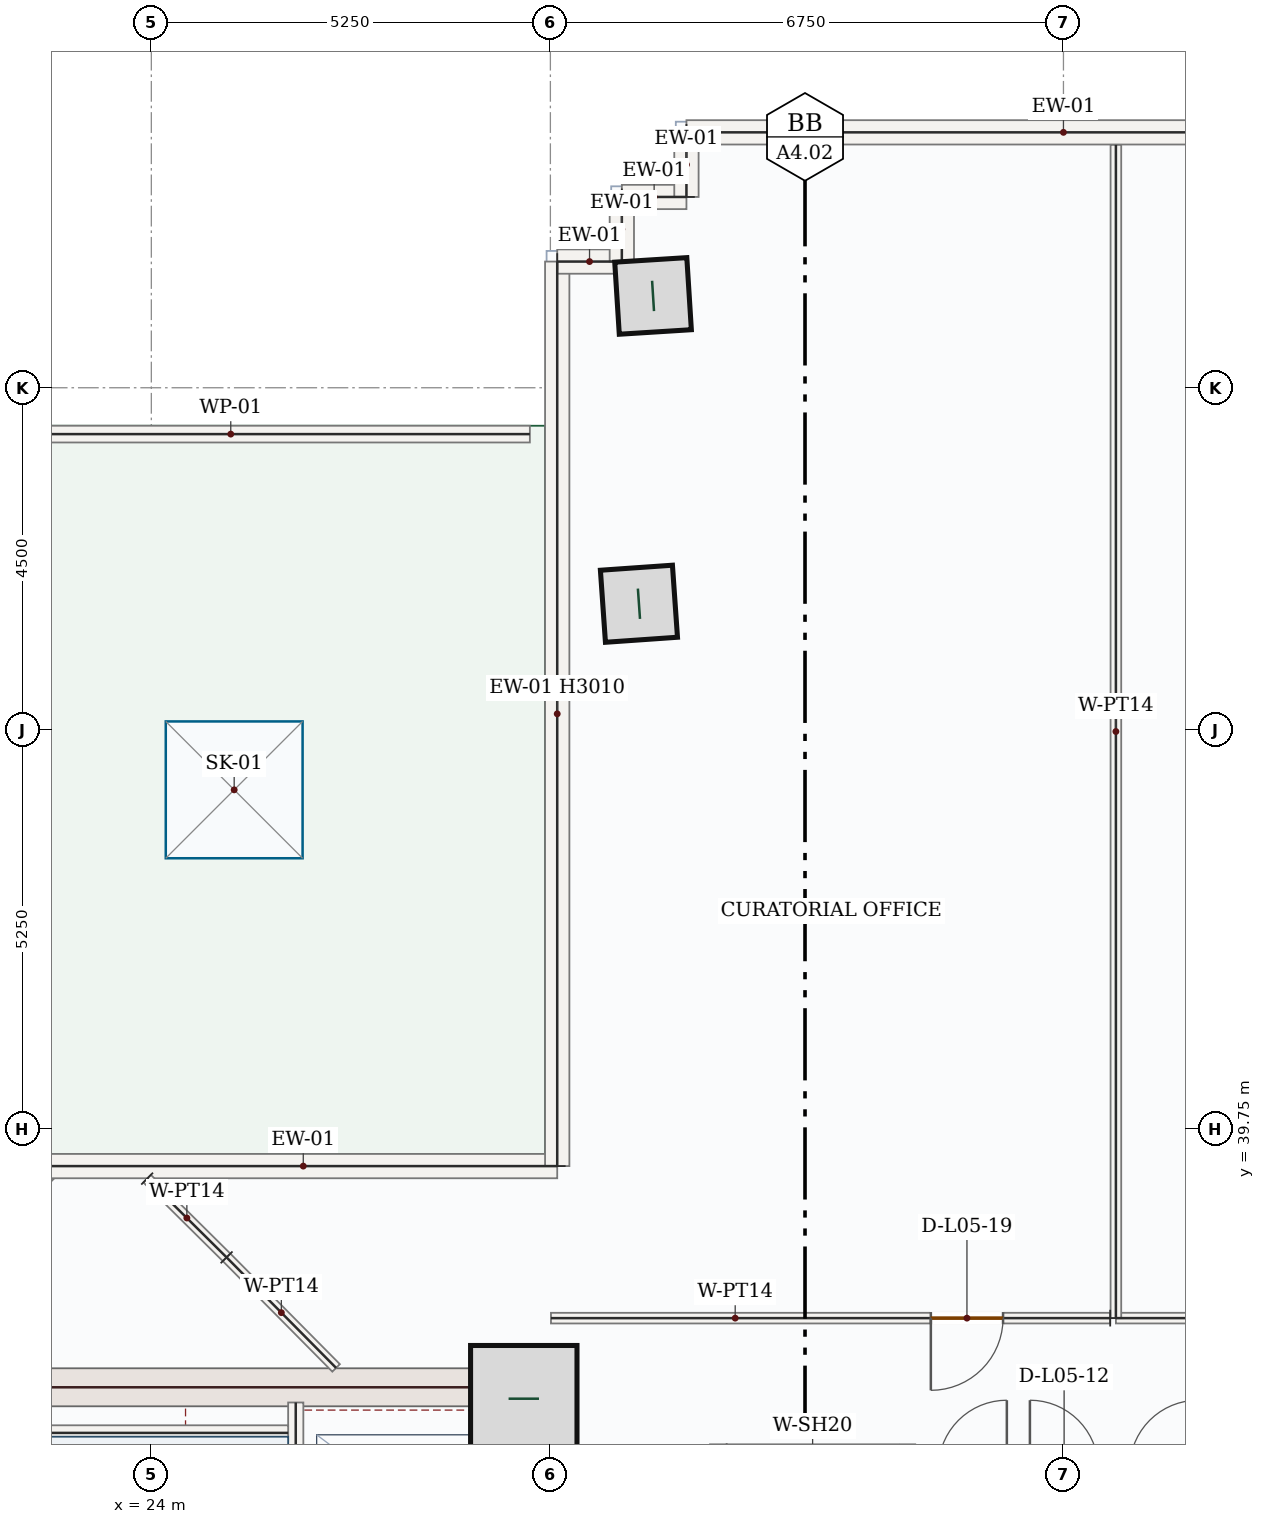
"""IFC4 building model, lengths in metres.
Left out: names, types, materials, properties, quantities, classifications, styles, units other than length and angle.
Written with IfcOpenShell. Run it as: python <this file> out.ifc"""

import sys

from ifc_helpers import new_model, si_unit, direction, frame, frame_2d, origin, origin_2d, place, context, subcontext, project, spatial, rectangle, hollow_rectangle, extrude, source, transform, mapped, element, fill, save


model = new_model("IFC4")
c1 = context("Model", 3, precision=1e-05, world=origin(), true_north=direction((0.0, 1.0)))
c2 = subcontext(c1, "Body", "Model", "MODEL_VIEW")
j1 = project(units=[si_unit("LENGTHUNIT", "METRE"), si_unit("PLANEANGLEUNIT", "RADIAN")], contexts=[c1])
p1 = place(None, origin())
s1 = spatial("IfcSite", under=j1, at=p1, CompositionType="ELEMENT")
p2 = place(p1, origin())
s2 = spatial("IfcBuilding", under=s1, at=p2, CompositionType="ELEMENT")
p3 = place(p2, frame((0.0, 0.0, 29.1)))
s3 = spatial("IfcBuildingStorey", under=s2, at=p3, CompositionType="ELEMENT", Elevation=29.1)
p4 = place(p3, frame((29.0, 28.05, 0.0), z_axis=(0.0, 0.0, 1.0), x_axis=(0.0, 1.0, 0.0)))
e1 = element("IfcWall", 1, at=p4, inside=s3, PredefinedType="SHEAR", context=c2, shape_type="SweptSolid", body=[
    extrude(rectangle(XDim=8.55, YDim=0.5, at=frame_2d((4.275, 0.0))), origin(), (0.0, 0.0, 1.0), 3.95),
])
p5 = place(p4, frame((1.5, 0.0, 0.0)))
e2 = element("IfcOpeningElement", 2, at=p5, cuts=e1, PredefinedType="OPENING", context=c2, shape_type="SweptSolid", body=[
    extrude(rectangle(XDim=1.1, YDim=2.2, at=frame_2d((0.55, 1.1))), frame((0.0, 0.26, 0.0), z_axis=(0.0, -1.0, 0.0), x_axis=(1.0, 0.0, 0.0)), (0.0, 0.0, 1.0), 0.52),
])
m1 = source(origin(), c2, "Body", "SweptSolid", [
    extrude(rectangle(XDim=7.0, YDim=0.5, at=frame_2d((3.5, 0.0))), origin(), (0.0, 0.0, 1.0), 3.95),
])
p6 = place(p3, frame((21.75, 36.35, 0.0), z_axis=(0.0, 0.0, 1.0), x_axis=(1.0, 0.0, 0.0)))
e3 = element("IfcWall", 3, at=p6, inside=s3, PredefinedType="SHEAR", context=c2, shape_type="MappedRepresentation", body=[
    mapped(m1, transform((0.0, 0.0, 0.0), x_axis=(1.0, 0.0, 0.0), y_axis=(0.0, 1.0, 0.0), z_axis=(0.0, 0.0, 1.0), scale=1.0)),
])
m2 = source(origin(), c2, "Body", "SweptSolid", [
    extrude(rectangle(XDim=1.4, YDim=1.4, at=origin_2d()), origin(), (0.0, 0.0, 1.0), 4.2),
])
p7 = place(p3, frame((28.9, 36.2, 0.0), z_axis=(0.0, 0.0, 1.0), x_axis=(1.0, 0.0, 0.0)))
e4 = element("IfcColumn", 4, at=p7, inside=s3, PredefinedType="COLUMN", context=c2, shape_type="MappedRepresentation", body=[
    mapped(m2, transform((0.0, 0.0, 0.0), x_axis=(1.0, 0.0, 0.0), y_axis=(0.0, 1.0, 0.0), z_axis=(0.0, 0.0, 1.0), scale=1.0)),
])
m3 = source(origin(), c2, "Body", "SweptSolid", [
    extrude(hollow_rectangle(XDim=0.95, YDim=0.95, WallThickness=0.05, at=origin_2d()), origin(), (0.0, 0.0, 1.0), 4.2),
])
for number, where, z_axis, x_axis in (
    (5, (30.415, 46.658, 0.0), (0.0, 0.0, 1.0), (-0.07, 0.998, 0.0)),
    (6, (30.601, 50.708, 0.0), (0.0, 0.0, 1.0), (-0.063, 0.998, 0.0)),
):
    element("IfcColumn", number, at=place(p3, frame(where, z_axis=z_axis, x_axis=x_axis)), inside=s3, PredefinedType="COLUMN", context=c2, shape_type="MappedRepresentation", body=[
        mapped(m3, transform((0.0, 0.0, 0.0), x_axis=(1.0, 0.0, 0.0), y_axis=(0.0, 1.0, 0.0), z_axis=(0.0, 0.0, 1.0), scale=1.0)),
    ])
m4 = source(origin(), c2, "Body", "SweptSolid", [
    extrude(rectangle(XDim=7.87, YDim=0.22, at=frame_2d((3.935, 0.0))), origin(), (0.0, 0.0, 1.0), 1.2),
])
p8 = place(p3, frame((21.11, 48.89, 0.0), z_axis=(0.0, 0.0, 1.0), x_axis=(1.0, 0.0, 0.0)))
e7 = element("IfcWall", 7, at=p8, inside=s3, PredefinedType="PARAPET", context=c2, shape_type="MappedRepresentation", body=[
    mapped(m4, transform((0.0, 0.0, 0.0), x_axis=(1.0, 0.0, 0.0), y_axis=(0.0, 1.0, 0.0), z_axis=(0.0, 0.0, 1.0), scale=1.0)),
])
m5 = source(origin(), c2, "Body", "SweptSolid", [
    extrude(rectangle(XDim=5.258, YDim=0.32, at=frame_2d((2.629, 0.0))), origin(), (0.0, 0.0, 1.0), 3.95),
])
p9 = place(p3, frame((18.94, 35.542, 0.0), z_axis=(0.0, 0.0, 1.0), x_axis=(0.707106781187, 0.707106781187, 0.0)))
e8 = element("IfcWall", 8, at=p9, inside=s3, PredefinedType="SOLIDWALL", context=c2, shape_type="MappedRepresentation", body=[
    mapped(m5, transform((0.0, 0.0, 0.0), x_axis=(1.0, 0.0, 0.0), y_axis=(0.0, 1.0, 0.0), z_axis=(0.0, 0.0, 1.0), scale=1.0)),
])
m6 = source(origin(), c2, "Body", "SweptSolid", [
    extrude(rectangle(XDim=6.682, YDim=0.32, at=frame_2d((3.341, 0.0))), origin(), (0.0, 0.0, 1.0), 3.95),
])
p10 = place(p3, frame((22.658, 39.26, 0.0), z_axis=(0.0, 0.0, 1.0), x_axis=(1.0, 0.0, 0.0)))
e9 = element("IfcWall", 9, at=p10, inside=s3, PredefinedType="SOLIDWALL", context=c2, shape_type="MappedRepresentation", body=[
    mapped(m6, transform((0.0, 0.0, 0.0), x_axis=(1.0, 0.0, 0.0), y_axis=(0.0, 1.0, 0.0), z_axis=(0.0, 0.0, 1.0), scale=1.0)),
])
m7 = source(origin(), c2, "Body", "SweptSolid", [
    extrude(rectangle(XDim=11.9, YDim=0.32, at=frame_2d((5.95, 0.0))), origin(), (0.0, 0.0, 1.0), 3.01),
])
p11 = place(p3, frame((29.34, 39.26, 0.0), z_axis=(0.0, 0.0, 1.0), x_axis=(0.0, 1.0, 0.0)))
e10 = element("IfcWall", 10, at=p11, inside=s3, PredefinedType="SOLIDWALL", context=c2, shape_type="MappedRepresentation", body=[
    mapped(m7, transform((0.0, 0.0, 0.0), x_axis=(1.0, 0.0, 0.0), y_axis=(0.0, 1.0, 0.0), z_axis=(0.0, 0.0, 1.0), scale=1.0)),
])
m8 = source(origin(), c2, "Body", "SweptSolid", [
    extrude(rectangle(XDim=0.85, YDim=0.32, at=frame_2d((0.425, 0.0))), origin(), (0.0, 0.0, 1.0), 3.95),
])
p12 = place(p3, frame((29.34, 51.16, 0.0), z_axis=(0.0, 0.0, 1.0), x_axis=(1.0, 0.0, 0.0)))
e11 = element("IfcWall", 11, at=p12, inside=s3, PredefinedType="SOLIDWALL", context=c2, shape_type="MappedRepresentation", body=[
    mapped(m8, transform((0.0, 0.0, 0.0), x_axis=(1.0, 0.0, 0.0), y_axis=(0.0, 1.0, 0.0), z_axis=(0.0, 0.0, 1.0), scale=1.0)),
])
m9 = source(origin(), c2, "Body", "SweptSolid", [
    extrude(rectangle(XDim=0.85, YDim=0.32, at=frame_2d((0.425, 0.0))), origin(), (0.0, 0.0, 1.0), 3.95),
])
for number, where, z_axis, x_axis in (
    (12, (30.19, 51.16, 0.0), (0.0, 0.0, 1.0), (0.0, 1.0, 0.0)),
    (13, (30.19, 52.01, 0.0), (0.0, 0.0, 1.0), (1.0, 0.0, 0.0)),
    (14, (31.04, 52.01, 0.0), (0.0, 0.0, 1.0), (0.0, 1.0, 0.0)),
):
    element("IfcWall", number, at=place(p3, frame(where, z_axis=z_axis, x_axis=x_axis)), inside=s3, PredefinedType="SOLIDWALL", context=c2, shape_type="MappedRepresentation", body=[
        mapped(m9, transform((0.0, 0.0, 0.0), x_axis=(1.0, 0.0, 0.0), y_axis=(0.0, 1.0, 0.0), z_axis=(0.0, 0.0, 1.0), scale=1.0)),
    ])
m10 = source(origin(), c2, "Body", "SweptSolid", [
    extrude(rectangle(XDim=9.92, YDim=0.32, at=frame_2d((4.96, 0.0))), origin(), (0.0, 0.0, 1.0), 3.95),
])
p13 = place(p3, frame((31.04, 52.86, 0.0), z_axis=(0.0, 0.0, 1.0), x_axis=(1.0, 0.0, 0.0)))
e15 = element("IfcWall", 15, at=p13, inside=s3, PredefinedType="SOLIDWALL", context=c2, shape_type="MappedRepresentation", body=[
    mapped(m10, transform((0.0, 0.0, 0.0), x_axis=(1.0, 0.0, 0.0), y_axis=(0.0, 1.0, 0.0), z_axis=(0.0, 0.0, 1.0), scale=1.0)),
])
p14 = place(p3, frame((25.9, 28.15, 0.0), z_axis=(0.0, 0.0, 1.0), x_axis=(0.0, 1.0, 0.0)))
e16 = element("IfcWall", 16, at=p14, inside=s3, PredefinedType="SOLIDWALL", context=c2, shape_type="SweptSolid", body=[
    extrude(rectangle(XDim=8.0, YDim=0.2, at=frame_2d((4.0, 0.0))), origin(), (0.0, 0.0, 1.0), 3.95),
])
p15 = place(p14, frame((0.4, 0.0, 0.0)))
e17 = element("IfcOpeningElement", 17, at=p15, cuts=e16, PredefinedType="OPENING", context=c2, shape_type="SweptSolid", body=[
    extrude(rectangle(XDim=1.05, YDim=2.15, at=frame_2d((0.525, 1.075))), frame((0.0, 0.11, 0.0), z_axis=(0.0, -1.0, 0.0), x_axis=(1.0, 0.0, 0.0)), (0.0, 0.0, 1.0), 0.22),
])
m11 = source(origin(), c2, "Body", "SweptSolid", [
    extrude(rectangle(XDim=3.25, YDim=0.2, at=frame_2d((1.625, 0.0))), origin(), (0.0, 0.0, 1.0), 3.95),
])
p16 = place(p3, frame((22.55, 35.75, 0.0), z_axis=(0.0, 0.0, 1.0), x_axis=(1.0, 0.0, 0.0)))
e18 = element("IfcWall", 18, at=p16, inside=s3, PredefinedType="SOLIDWALL", context=c2, shape_type="MappedRepresentation", body=[
    mapped(m11, transform((0.0, 0.0, 0.0), x_axis=(1.0, 0.0, 0.0), y_axis=(0.0, 1.0, 0.0), z_axis=(0.0, 0.0, 1.0), scale=1.0)),
])
m12 = source(origin(), c2, "Body", "SweptSolid", [
    extrude(rectangle(XDim=2.4, YDim=0.2, at=frame_2d((1.2, 0.0))), origin(), (0.0, 0.0, 1.0), 3.95),
])
for number, where, z_axis, x_axis in (
    (19, (31.45, 33.2, 0.0), (0.0, 0.0, 1.0), (0.0, 1.0, 0.0)),
    (20, (33.95, 33.2, 0.0), (0.0, 0.0, 1.0), (0.0, 1.0, 0.0)),
):
    element("IfcWall", number, at=place(p3, frame(where, z_axis=z_axis, x_axis=x_axis)), inside=s3, PredefinedType="SOLIDWALL", context=c2, shape_type="MappedRepresentation", body=[
        mapped(m12, transform((0.0, 0.0, 0.0), x_axis=(1.0, 0.0, 0.0), y_axis=(0.0, 1.0, 0.0), z_axis=(0.0, 0.0, 1.0), scale=1.0)),
    ])
m13 = source(origin(), c2, "Body", "SweptSolid", [
    extrude(rectangle(XDim=1.471, YDim=0.14, at=frame_2d((0.736, 0.0))), origin(), (0.0, 0.0, 1.0), 3.95),
])
p17 = place(p3, frame((23.945, 39.095, 0.0), z_axis=(0.0, 0.0, 1.0), x_axis=(0.710417151562, -0.703780840011, 0.0)))
e21 = element("IfcWall", 21, at=p17, inside=s3, PredefinedType="PARTITIONING", context=c2, shape_type="MappedRepresentation", body=[
    mapped(m13, transform((0.0, 0.0, 0.0), x_axis=(1.0, 0.0, 0.0), y_axis=(0.0, 1.0, 0.0), z_axis=(0.0, 0.0, 1.0), scale=1.0)),
])
m14 = source(origin(), c2, "Body", "SweptSolid", [
    extrude(rectangle(XDim=2.047, YDim=0.14, at=frame_2d((1.024, 0.0))), origin(), (0.0, 0.0, 1.0), 3.95),
])
p18 = place(p3, frame((24.99, 38.059, 0.0), z_axis=(0.0, 0.0, 1.0), x_axis=(0.703819772346, -0.710378580797, 0.0)))
e22 = element("IfcWall", 22, at=p18, inside=s3, PredefinedType="PARTITIONING", context=c2, shape_type="MappedRepresentation", body=[
    mapped(m14, transform((0.0, 0.0, 0.0), x_axis=(1.0, 0.0, 0.0), y_axis=(0.0, 1.0, 0.0), z_axis=(0.0, 0.0, 1.0), scale=1.0)),
])
p19 = place(p3, frame((42.742, 37.26, 0.0), z_axis=(0.0, 0.0, 1.0), x_axis=(-0.999999999186, 4.0337219e-05, 0.0)))
e23 = element("IfcWall", 23, at=p19, inside=s3, PredefinedType="PARTITIONING", context=c2, shape_type="SweptSolid", body=[
    extrude(rectangle(XDim=6.052, YDim=0.14, at=frame_2d((3.026, 0.0))), origin(), (0.0, 0.0, 1.0), 3.95),
])
p20 = place(p19, frame((3.98, 0.0, 0.0)))
e24 = element("IfcOpeningElement", 24, at=p20, cuts=e23, PredefinedType="OPENING", context=c2, shape_type="SweptSolid", body=[
    extrude(rectangle(XDim=0.95, YDim=2.15, at=frame_2d((0.475, 1.075))), frame((0.0, 0.08, 0.0), z_axis=(0.0, -1.0, 0.0), x_axis=(1.0, 0.0, 0.0)), (0.0, 0.0, 1.0), 0.16),
])
m15 = source(origin(), c2, "Body", "SweptSolid", [
    extrude(rectangle(XDim=15.435, YDim=0.14, at=frame_2d((7.718, 0.0))), origin(), (0.0, 0.0, 1.0), 3.95),
])
p21 = place(p3, frame((36.69, 37.26, 0.0), z_axis=(0.0, 0.0, 1.0), x_axis=(0.0, 1.0, 0.0)))
e25 = element("IfcWall", 25, at=p21, inside=s3, PredefinedType="PARTITIONING", context=c2, shape_type="MappedRepresentation", body=[
    mapped(m15, transform((0.0, 0.0, 0.0), x_axis=(1.0, 0.0, 0.0), y_axis=(0.0, 1.0, 0.0), z_axis=(0.0, 0.0, 1.0), scale=1.0)),
])
p22 = place(p3, frame((36.615, 37.26, 0.0), z_axis=(0.0, 0.0, 1.0), x_axis=(-0.999999999449, -3.3182904e-05, 0.0)))
e26 = element("IfcWall", 26, at=p22, inside=s3, PredefinedType="PARTITIONING", context=c2, shape_type="SweptSolid", body=[
    extrude(rectangle(XDim=7.357, YDim=0.14, at=frame_2d((3.679, 0.0))), origin(), (0.0, 0.0, 1.0), 3.95),
])
p23 = place(p22, frame((1.41, 0.0, 0.0)))
e27 = element("IfcOpeningElement", 27, at=p23, cuts=e26, PredefinedType="OPENING", context=c2, shape_type="SweptSolid", body=[
    extrude(rectangle(XDim=0.95, YDim=2.15, at=frame_2d((0.475, 1.075))), frame((0.0, 0.08, 0.0), z_axis=(0.0, -1.0, 0.0), x_axis=(1.0, 0.0, 0.0)), (0.0, 0.0, 1.0), 0.16),
])
p24 = place(p3, frame((0.0, 0.0, -0.22)))
p25 = place(p24, frame((25.09, 44.21, 0.0)))
p26 = place(p25, frame((0.0, 0.0, 0.22)))
e28 = element("IfcWindow", 28, at=p26, inside=s3, PartitioningType="SINGLE_PANEL", PredefinedType="SKYLIGHT", context=c2, shape_type="SweptSolid", body=[
    extrude(rectangle(XDim=1.8, YDim=1.8, at=origin_2d()), origin(), (0.0, 0.0, 1.0), 0.05),
])
m16 = source(origin(), c2, "Body", "SweptSolid", [
    extrude(rectangle(XDim=0.95, YDim=2.15, at=frame_2d((0.475, 1.075))), frame((0.0, 0.025, 0.0), z_axis=(0.0, -1.0, 0.0), x_axis=(1.0, 0.0, 0.0)), (0.0, 0.0, 1.0), 0.05),
])
p27 = place(p23, origin())
e29 = element("IfcDoor", 29, at=p27, inside=s3, OperationType="SINGLE_SWING_RIGHT", PredefinedType="DOOR", context=c2, shape_type="MappedRepresentation", body=[
    mapped(m16, transform((0.0, 0.0, 0.0), x_axis=(1.0, 0.0, 0.0), y_axis=(0.0, 1.0, 0.0), z_axis=(0.0, 0.0, 1.0), scale=1.0)),
])
fill(e27, e29)
save(model, sys.argv[1])
